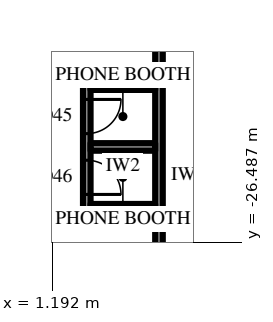
"""IFC4 building model, lengths in metres.
Left out: names, types, materials, properties, quantities, classifications, styles, units other than length and angle.
Written with IfcOpenShell. Run it as: python <this file> out.ifc"""

import sys

from ifc_helpers import new_model, si_unit, direction, frame, frame_2d, origin, place, context, subcontext, project, spatial, rectangle, extrude, element, fill, save


model = new_model("IFC4")
c1 = context("Model", 3, precision=1e-05, world=origin(), true_north=direction((0.0, 1.0)))
c2 = subcontext(c1, "Body", "Model", "MODEL_VIEW")
j1 = project(units=[si_unit("LENGTHUNIT", "METRE"), si_unit("PLANEANGLEUNIT", "RADIAN")], contexts=[c1])
p1 = place(None, origin())
s1 = spatial("IfcSite", under=j1, at=p1, CompositionType="ELEMENT")
p2 = place(p1, origin())
s2 = spatial("IfcBuilding", under=s1, at=p2, CompositionType="ELEMENT")
p3 = place(p2, frame((0.0, 0.0, 73.9)))
s3 = spatial("IfcBuildingStorey", under=s2, at=p3, CompositionType="ELEMENT", Elevation=73.9)
p4 = place(p3, frame((4.0, -18.7, 0.0), z_axis=(0.0, 0.0, 1.0), x_axis=(0.0, -1.0, 0.0)))
e1 = element("IfcWall", 1, at=p4, inside=s3, PredefinedType="PARTITIONING", context=c2, shape_type="SweptSolid", body=[
    extrude(rectangle(XDim=15.1, YDim=0.2, at=frame_2d((7.55, 0.0))), origin(), (0.0, 0.0, 1.0), 4.0),
])
p5 = place(p4, frame((1.01, 0.0, 0.0)))
e2 = element("IfcOpeningElement", 2, at=p5, cuts=e1, PredefinedType="OPENING", context=c2, shape_type="SweptSolid", body=[
    extrude(rectangle(XDim=1.0, YDim=2.2, at=frame_2d((0.5, 1.1))), frame((0.0, 0.11, 0.0), z_axis=(0.0, -1.0, 0.0), x_axis=(1.0, 0.0, 0.0)), (0.0, 0.0, 1.0), 0.22),
])
p6 = place(p3, frame((2.1, -22.285, 0.0), z_axis=(0.0, 0.0, 1.0), x_axis=(0.0, -1.0, 0.0)))
e3 = element("IfcWall", 3, at=p6, inside=s3, PredefinedType="PARTITIONING", context=c2, shape_type="SweptSolid", body=[
    extrude(rectangle(XDim=3.4, YDim=0.2, at=frame_2d((1.7, 0.0))), origin(), (0.0, 0.0, 1.0), 4.0),
])
p7 = place(p6, frame((0.45, 0.0, 0.0)))
e4 = element("IfcOpeningElement", 4, at=p7, cuts=e3, PredefinedType="OPENING", context=c2, shape_type="SweptSolid", body=[
    extrude(rectangle(XDim=0.9, YDim=2.2, at=frame_2d((0.45, 1.1))), frame((0.0, 0.11, 0.0), z_axis=(0.0, -1.0, 0.0), x_axis=(1.0, 0.0, 0.0)), (0.0, 0.0, 1.0), 0.22),
])
p8 = place(p6, frame((2.05, 0.0, 0.0)))
e5 = element("IfcOpeningElement", 5, at=p8, cuts=e3, PredefinedType="OPENING", context=c2, shape_type="SweptSolid", body=[
    extrude(rectangle(XDim=0.9, YDim=2.2, at=frame_2d((0.45, 1.1))), frame((0.0, 0.11, 0.0), z_axis=(0.0, -1.0, 0.0), x_axis=(1.0, 0.0, 0.0)), (0.0, 0.0, 1.0), 0.22),
])
for number, where, z_axis, x_axis in (
    (6, (3.9, -22.385, 0.0), (0.0, 0.0, 1.0), (-1.0, 0.0, 0.0)),
    (7, (3.9, -23.985, 0.0), (0.0, 0.0, 1.0), (-1.0, 0.0, 0.0)),
    (8, (3.9, -25.585, 0.0), (0.0, 0.0, 1.0), (-1.0, 0.0, 0.0)),
):
    element("IfcWall", number, at=place(p3, frame(where, z_axis=z_axis, x_axis=x_axis)), inside=s3, PredefinedType="PARTITIONING", context=c2, shape_type="SweptSolid", body=[
        extrude(rectangle(XDim=1.7, YDim=0.2, at=frame_2d((0.85, 0.0))), origin(), (0.0, 0.0, 1.0), 4.0),
    ])
p9 = place(p7, origin())
e9 = element("IfcDoor", 9, at=p9, inside=s3, OperationType="SINGLE_SWING_RIGHT", PredefinedType="DOOR", context=c2, shape_type="SweptSolid", body=[
    extrude(rectangle(XDim=0.9, YDim=2.2, at=frame_2d((0.45, 1.1))), frame((0.0, 0.025, 0.0), z_axis=(0.0, -1.0, 0.0), x_axis=(1.0, 0.0, 0.0)), (0.0, 0.0, 1.0), 0.05),
])
fill(e4, e9)
p10 = place(p8, origin())
e10 = element("IfcDoor", 10, at=p10, inside=s3, OperationType="SINGLE_SWING_LEFT", PredefinedType="DOOR", context=c2, shape_type="SweptSolid", body=[
    extrude(rectangle(XDim=0.9, YDim=2.2, at=frame_2d((0.45, 1.1))), frame((0.0, 0.025, 0.0), z_axis=(0.0, -1.0, 0.0), x_axis=(1.0, 0.0, 0.0)), (0.0, 0.0, 1.0), 0.05),
])
fill(e5, e10)
save(model, sys.argv[1])
